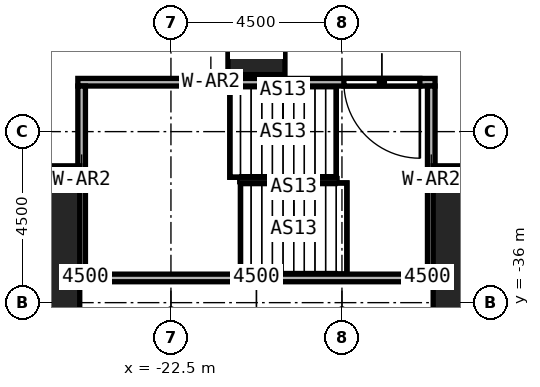
"""IFC4 building model, lengths in metres.
Left out: names, types, materials, properties, quantities, classifications, styles, units other than length and angle.
Written with IfcOpenShell. Run it as: python <this file> out.ifc"""

import sys

from ifc_helpers import new_model, si_unit, direction, frame, frame_2d, origin, origin_2d, place, context, subcontext, project, spatial, rectangle, extrude, element, fill, save


model = new_model("IFC4")
c1 = context("Model", 3, precision=1e-05, world=origin(), true_north=direction((0.0, 1.0)))
c2 = subcontext(c1, "Body", "Model", "MODEL_VIEW")
j1 = project(units=[si_unit("LENGTHUNIT", "METRE"), si_unit("PLANEANGLEUNIT", "RADIAN")], contexts=[c1])
p1 = place(None, origin())
s1 = spatial("IfcSite", under=j1, at=p1, CompositionType="ELEMENT")
p2 = place(p1, origin())
s2 = spatial("IfcBuilding", under=s1, at=p2, CompositionType="ELEMENT")
p3 = place(p2, frame((0.0, 0.0, 12.0)))
s3 = spatial("IfcBuildingStorey", under=s2, at=p3, CompositionType="ELEMENT", Elevation=12.0)
for number, where, z_axis, x_axis in (
    (1, (-27.0, -35.7, 0.0), (0.0, 0.0, 1.0), (1.0, 0.0, 0.0)),
    (2, (-13.5, -35.7, 0.0), (0.0, 0.0, 1.0), (1.0, 0.0, 0.0)),
):
    element("IfcColumn", number, at=place(p3, frame(where, z_axis=z_axis, x_axis=x_axis)), inside=s3, PredefinedType="COLUMN", context=c2, shape_type="SweptSolid", body=[
        extrude(rectangle(XDim=4.2, YDim=6.6, at=origin_2d()), origin(), (0.0, 0.0, 1.0), 7.0),
    ])
p4 = place(p3, frame((-20.25, -29.25, 0.0), z_axis=(0.0, 0.0, 1.0), x_axis=(1.0, 0.0, 0.0)))
e3 = element("IfcColumn", 3, at=p4, inside=s3, PredefinedType="COLUMN", context=c2, shape_type="SweptSolid", body=[
    extrude(rectangle(XDim=1.5, YDim=1.5, at=origin_2d()), origin(), (0.0, 0.0, 1.0), 7.0),
])
p5 = place(p3, frame((-15.55, -30.2, 0.0), z_axis=(0.0, 0.0, 1.0), x_axis=(-1.0, 0.0, 0.0)))
e4 = element("IfcWall", 4, at=p5, inside=s3, PredefinedType="SOLIDWALL", context=c2, shape_type="SweptSolid", body=[
    extrude(rectangle(XDim=9.4, YDim=0.2, at=frame_2d((4.7, 0.0))), origin(), (0.0, 0.0, 1.0), 7.0),
])
p6 = place(p5, frame((0.4, 0.0, 0.0)))
e5 = element("IfcOpeningElement", 5, at=p6, cuts=e4, PredefinedType="OPENING", context=c2, shape_type="SweptSolid", body=[
    extrude(rectangle(XDim=2.0, YDim=2.4, at=frame_2d((1.0, 1.2))), frame((0.0, 0.1, 0.0), z_axis=(0.0, -1.0, 0.0), x_axis=(1.0, 0.0, 0.0)), (0.0, 0.0, 1.0), 0.2),
])
p7 = place(p3, frame((-24.95, -35.35, 0.0), z_axis=(0.0, 0.0, 1.0), x_axis=(1.0, 0.0, 0.0)))
e6 = element("IfcWall", 6, at=p7, inside=s3, PredefinedType="SOLIDWALL", context=c2, shape_type="SweptSolid", body=[
    extrude(rectangle(XDim=9.4, YDim=0.2, at=frame_2d((4.7, 0.0))), origin(), (0.0, 0.0, 1.0), 7.0),
])
for number, where, z_axis, x_axis in (
    (7, (-24.85, -35.25, 0.0), (0.0, 0.0, 1.0), (0.0, 1.0, 0.0)),
    (8, (-15.65, -35.25, 0.0), (0.0, 0.0, 1.0), (0.0, 1.0, 0.0)),
):
    element("IfcWall", number, at=place(p3, frame(where, z_axis=z_axis, x_axis=x_axis)), inside=s3, PredefinedType="SOLIDWALL", context=c2, shape_type="SweptSolid", body=[
        extrude(rectangle(XDim=4.95, YDim=0.2, at=frame_2d((2.475, 0.0))), origin(), (0.0, 0.0, 1.0), 7.0),
    ])
p8 = place(p6, origin())
e9 = element("IfcDoor", 9, at=p8, inside=s3, OperationType="DOUBLE_DOOR_SINGLE_SWING", PredefinedType="DOOR", context=c2, shape_type="SweptSolid", body=[
    extrude(rectangle(XDim=2.0, YDim=2.4, at=frame_2d((1.0, 1.2))), frame((0.0, 0.025, 0.0), z_axis=(0.0, -1.0, 0.0), x_axis=(1.0, 0.0, 0.0)), (0.0, 0.0, 1.0), 0.05),
])
fill(e5, e9)
save(model, sys.argv[1])
